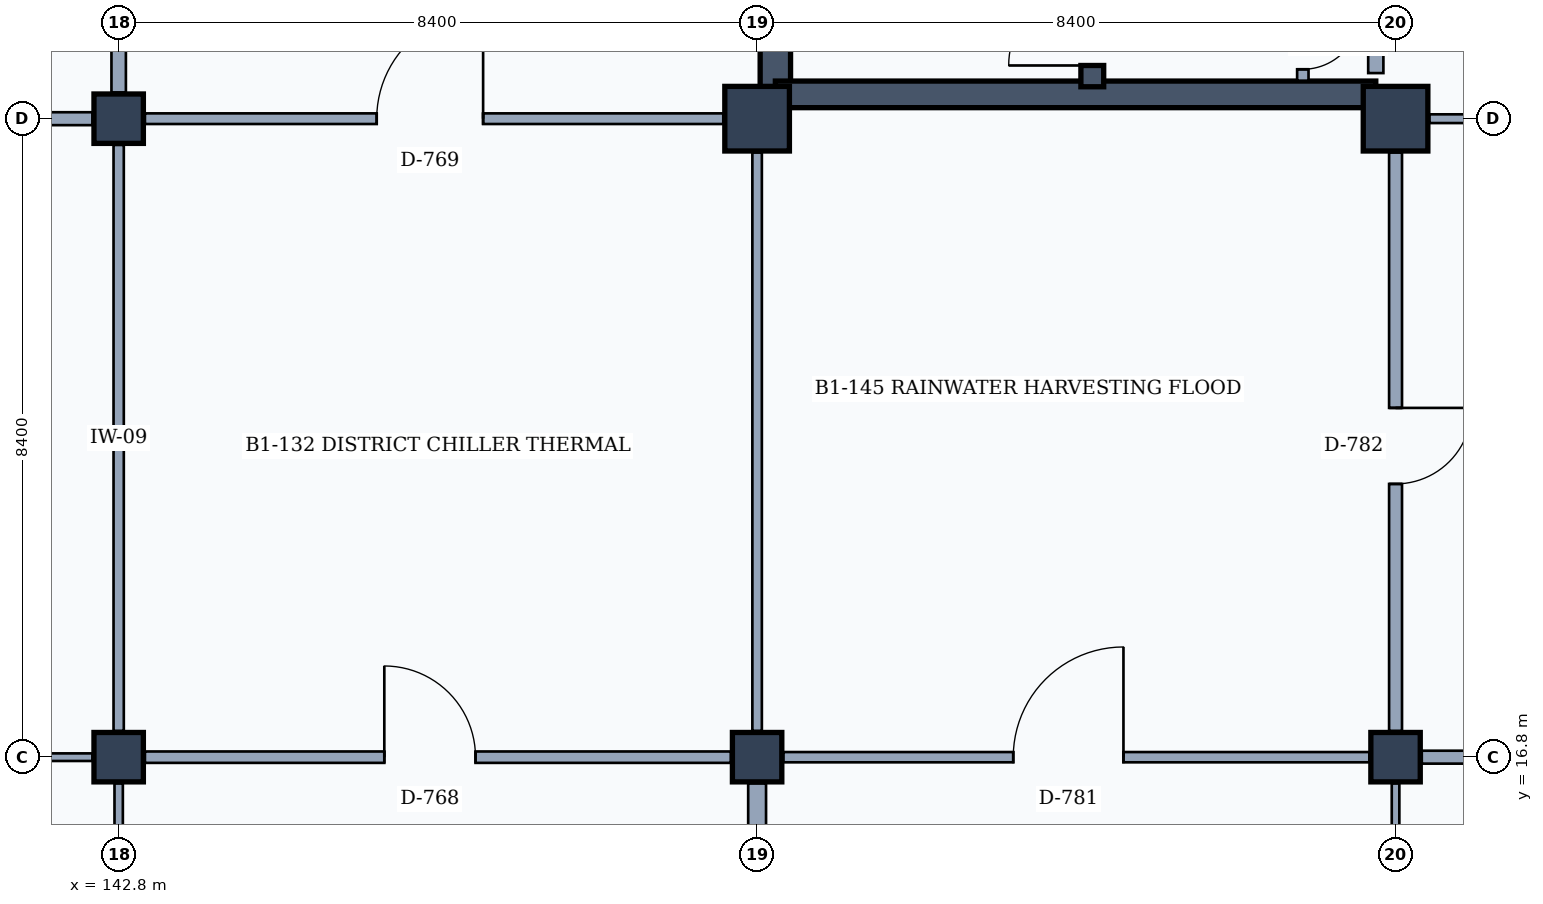
"""IFC4 building model, lengths in metres.
Left out: names, types, materials, properties, quantities, classifications, styles, units other than length and angle.
Written with IfcOpenShell. Run it as: python <this file> out.ifc"""

import sys

from ifc_helpers import new_model, si_unit, direction, frame, frame_2d, origin, origin_2d, place, context, subcontext, project, spatial, rectangle, extrude, element, fill, save


model = new_model("IFC4")
c1 = context("Model", 3, precision=1e-05, world=origin(), true_north=direction((0.0, 1.0)))
c2 = subcontext(c1, "Body", "Model", "MODEL_VIEW")
j1 = project(units=[si_unit("LENGTHUNIT", "METRE"), si_unit("PLANEANGLEUNIT", "RADIAN")], contexts=[c1])
p1 = place(None, origin())
s1 = spatial("IfcSite", under=j1, at=p1, CompositionType="ELEMENT")
p2 = place(p1, origin())
s2 = spatial("IfcBuilding", under=s1, at=p2, CompositionType="ELEMENT")
p3 = place(p2, frame((0.0, 0.0, -4.2)))
s3 = spatial("IfcBuildingStorey", under=s2, at=p3, CompositionType="ELEMENT", Elevation=-4.2)
for number, where, z_axis, x_axis in (
    (1, (142.8, 16.8, 0.0), (0.0, 0.0, 1.0), (1.0, 0.0, 0.0)),
    (2, (142.8, 25.2, 0.0), (0.0, 0.0, 1.0), (1.0, 0.0, 0.0)),
    (3, (151.2, 16.8, 0.0), (0.0, 0.0, 1.0), (1.0, 0.0, 0.0)),
):
    element("IfcColumn", number, at=place(p3, frame(where, z_axis=z_axis, x_axis=x_axis)), inside=s3, PredefinedType="COLUMN", context=c2, shape_type="SweptSolid", body=[
        extrude(rectangle(XDim=0.65, YDim=0.65, at=origin_2d()), origin(), (0.0, 0.0, 1.0), 4.2),
    ])
p4 = place(p3, frame((151.2, 25.2, 0.0), z_axis=(0.0, 0.0, 1.0), x_axis=(1.0, 0.0, 0.0)))
e4 = element("IfcColumn", 4, at=p4, inside=s3, PredefinedType="COLUMN", context=c2, shape_type="SweptSolid", body=[
    extrude(rectangle(XDim=0.85, YDim=0.85, at=origin_2d()), origin(), (0.0, 0.0, 1.0), 4.2),
])
p5 = place(p3, frame((159.6, 16.8, 0.0), z_axis=(0.0, 0.0, 1.0), x_axis=(1.0, 0.0, 0.0)))
e5 = element("IfcColumn", 5, at=p5, inside=s3, PredefinedType="COLUMN", context=c2, shape_type="SweptSolid", body=[
    extrude(rectangle(XDim=0.65, YDim=0.65, at=origin_2d()), origin(), (0.0, 0.0, 1.0), 4.2),
])
p6 = place(p3, frame((159.6, 25.2, 0.0), z_axis=(0.0, 0.0, 1.0), x_axis=(1.0, 0.0, 0.0)))
e6 = element("IfcColumn", 6, at=p6, inside=s3, PredefinedType="COLUMN", context=c2, shape_type="SweptSolid", body=[
    extrude(rectangle(XDim=0.85, YDim=0.85, at=origin_2d()), origin(), (0.0, 0.0, 1.0), 4.2),
])
p7 = place(p3, frame((151.44, 25.45, 0.0), z_axis=(0.0, 0.0, 1.0), x_axis=(0.0, 1.0, 0.0)))
e7 = element("IfcWall", 7, at=p7, inside=s3, PredefinedType="SHEAR", context=c2, shape_type="SweptSolid", body=[
    extrude(rectangle(XDim=7.94, YDim=0.4, at=frame_2d((3.97, 0.0))), origin(), (0.0, 0.0, 1.0), 3.9),
])
p8 = place(p3, frame((159.34, 33.0, 0.0), z_axis=(0.0, 0.0, 1.0), x_axis=(0.0, -1.0, 0.0)))
e8 = element("IfcWall", 8, at=p8, inside=s3, PredefinedType="PARTITIONING", context=c2, shape_type="SweptSolid", body=[
    extrude(rectangle(XDim=7.2, YDim=0.2, at=frame_2d((3.6, 0.0))), origin(), (0.0, 0.0, 1.0), 3.1),
])
p9 = place(p8, frame((3.55, 0.0, 0.0)))
e9 = element("IfcOpeningElement", 9, at=p9, cuts=e8, PredefinedType="OPENING", context=c2, shape_type="SweptSolid", body=[
    extrude(rectangle(XDim=1.1, YDim=2.15, at=frame_2d((0.55, 1.075))), frame((0.0, 0.11, 0.0), z_axis=(0.0, -1.0, 0.0), x_axis=(1.0, 0.0, 0.0)), (0.0, 0.0, 1.0), 0.22),
])
p10 = place(p3, frame((159.34, 25.52, 0.0), z_axis=(0.0, 0.0, 1.0), x_axis=(-1.0, 0.0, 0.0)))
e10 = element("IfcWall", 10, at=p10, inside=s3, PredefinedType="SHEAR", context=c2, shape_type="SweptSolid", body=[
    extrude(rectangle(XDim=7.9, YDim=0.35, at=frame_2d((3.95, 0.0))), origin(), (0.0, 0.0, 1.0), 3.9),
])
p11 = place(p3, frame((155.61, 25.62, 0.0), z_axis=(0.0, 0.0, 1.0), x_axis=(0.0, 1.0, 0.0)))
e11 = element("IfcWall", 11, at=p11, inside=s3, PredefinedType="SHEAR", context=c2, shape_type="SweptSolid", body=[
    extrude(rectangle(XDim=7.38, YDim=0.3, at=frame_2d((3.69, 0.0))), origin(), (0.0, 0.0, 1.0), 3.9),
])
p12 = place(p11, frame((0.28, 0.0, 0.0)))
e12 = element("IfcOpeningElement", 12, at=p12, cuts=e11, PredefinedType="OPENING", context=c2, shape_type="SweptSolid", body=[
    extrude(rectangle(XDim=1.1, YDim=2.15, at=frame_2d((0.55, 1.075))), frame((0.0, 0.16, 0.0), z_axis=(0.0, -1.0, 0.0), x_axis=(1.0, 0.0, 0.0)), (0.0, 0.0, 1.0), 0.32),
])
p13 = place(p3, frame((158.38, 26.76, 0.0), z_axis=(0.0, 0.0, 1.0), x_axis=(0.0, -1.0, 0.0)))
e13 = element("IfcWall", 13, at=p13, inside=s3, PredefinedType="PARTITIONING", context=c2, shape_type="SweptSolid", body=[
    extrude(rectangle(XDim=1.06, YDim=0.15, at=frame_2d((0.53, 0.0))), origin(), (0.0, 0.0, 1.0), 3.32),
])
p14 = place(p13, frame((0.16, 0.0, 0.0)))
e14 = element("IfcOpeningElement", 14, at=p14, cuts=e13, PredefinedType="OPENING", context=c2, shape_type="SweptSolid", body=[
    extrude(rectangle(XDim=0.75, YDim=2.05, at=frame_2d((0.375, 1.025))), frame((0.0, 0.085, 0.0), z_axis=(0.0, -1.0, 0.0), x_axis=(1.0, 0.0, 0.0)), (0.0, 0.0, 1.0), 0.17),
])
p15 = place(p3, frame((142.8, 8.745, 0.0), z_axis=(0.0, 0.0, 1.0), x_axis=(0.0, 1.0, 0.0)))
e15 = element("IfcWall", 15, at=p15, inside=s3, PredefinedType="PARTITIONING", context=c2, shape_type="SweptSolid", body=[
    extrude(rectangle(XDim=7.71, YDim=0.11, at=frame_2d((3.855, 0.0))), origin(), (0.0, 0.0, 1.0), 3.1),
])
p16 = place(p3, frame((134.745, 16.8, 0.0), z_axis=(0.0, 0.0, 1.0), x_axis=(1.0, 0.0, 0.0)))
e16 = element("IfcWall", 16, at=p16, inside=s3, PredefinedType="MOVABLE", context=c2, shape_type="SweptSolid", body=[
    extrude(rectangle(XDim=7.71, YDim=0.1, at=frame_2d((3.855, 0.0))), origin(), (0.0, 0.0, 1.0), 3.05),
])
p17 = place(p16, frame((3.225, 0.0, 0.0)))
e17 = element("IfcOpeningElement", 17, at=p17, cuts=e16, PredefinedType="OPENING", context=c2, shape_type="SweptSolid", body=[
    extrude(rectangle(XDim=1.05, YDim=2.2, at=frame_2d((0.525, 1.1))), frame((0.0, 0.06, 0.0), z_axis=(0.0, -1.0, 0.0), x_axis=(1.0, 0.0, 0.0)), (0.0, 0.0, 1.0), 0.12),
])
p18 = place(p3, frame((142.8, 17.145, 0.0), z_axis=(0.0, 0.0, 1.0), x_axis=(0.0, 1.0, 0.0)))
e18 = element("IfcWall", 18, at=p18, inside=s3, PredefinedType="PARTITIONING", context=c2, shape_type="SweptSolid", body=[
    extrude(rectangle(XDim=7.71, YDim=0.135, at=frame_2d((3.855, 0.0))), origin(), (0.0, 0.0, 1.0), 3.1),
])
p19 = place(p3, frame((134.745, 25.2, 0.0), z_axis=(0.0, 0.0, 1.0), x_axis=(1.0, 0.0, 0.0)))
e19 = element("IfcWall", 19, at=p19, inside=s3, PredefinedType="PARTITIONING", context=c2, shape_type="SweptSolid", body=[
    extrude(rectangle(XDim=7.71, YDim=0.17, at=frame_2d((3.855, 0.0))), origin(), (0.0, 0.0, 1.0), 3.05),
])
p20 = place(p19, frame((3.175, 0.0, 0.0)))
e20 = element("IfcOpeningElement", 20, at=p20, cuts=e19, PredefinedType="OPENING", context=c2, shape_type="SweptSolid", body=[
    extrude(rectangle(XDim=1.15, YDim=2.25, at=frame_2d((0.575, 1.125))), frame((0.0, 0.095, 0.0), z_axis=(0.0, -1.0, 0.0), x_axis=(1.0, 0.0, 0.0)), (0.0, 0.0, 1.0), 0.19),
])
p21 = place(p3, frame((142.8, 25.545, 0.0), z_axis=(0.0, 0.0, 1.0), x_axis=(0.0, 1.0, 0.0)))
e21 = element("IfcWall", 21, at=p21, inside=s3, PredefinedType="PARTITIONING", context=c2, shape_type="SweptSolid", body=[
    extrude(rectangle(XDim=7.71, YDim=0.19, at=frame_2d((3.855, 0.0))), origin(), (0.0, 0.0, 1.0), 3.1),
])
p22 = place(p3, frame((151.2, 8.745, 0.0), z_axis=(0.0, 0.0, 1.0), x_axis=(0.0, 1.0, 0.0)))
e22 = element("IfcWall", 22, at=p22, inside=s3, PredefinedType="PARTITIONING", context=c2, shape_type="SweptSolid", body=[
    extrude(rectangle(XDim=7.71, YDim=0.235, at=frame_2d((3.855, 0.0))), origin(), (0.0, 0.0, 1.0), 3.1),
])
p23 = place(p3, frame((143.145, 16.8, 0.0), z_axis=(0.0, 0.0, 1.0), x_axis=(1.0, 0.0, 0.0)))
e23 = element("IfcWall", 23, at=p23, inside=s3, PredefinedType="PARTITIONING", context=c2, shape_type="SweptSolid", body=[
    extrude(rectangle(XDim=7.71, YDim=0.15, at=frame_2d((3.855, 0.0))), origin(), (0.0, 0.0, 1.0), 3.05),
])
p24 = place(p23, frame((3.15, 0.0, 0.0)))
e24 = element("IfcOpeningElement", 24, at=p24, cuts=e23, PredefinedType="OPENING", context=c2, shape_type="SweptSolid", body=[
    extrude(rectangle(XDim=1.2, YDim=2.2, at=frame_2d((0.6, 1.1))), frame((0.0, 0.085, 0.0), z_axis=(0.0, -1.0, 0.0), x_axis=(1.0, 0.0, 0.0)), (0.0, 0.0, 1.0), 0.17),
])
p25 = place(p3, frame((151.2, 17.145, 0.0), z_axis=(0.0, 0.0, 1.0), x_axis=(0.0, 1.0, 0.0)))
e25 = element("IfcWall", 25, at=p25, inside=s3, PredefinedType="PARTITIONING", context=c2, shape_type="SweptSolid", body=[
    extrude(rectangle(XDim=7.61, YDim=0.125, at=frame_2d((3.805, 0.0))), origin(), (0.0, 0.0, 1.0), 3.1),
])
p26 = place(p3, frame((143.145, 25.2, 0.0), z_axis=(0.0, 0.0, 1.0), x_axis=(1.0, 0.0, 0.0)))
e26 = element("IfcWall", 26, at=p26, inside=s3, PredefinedType="PARTITIONING", context=c2, shape_type="SweptSolid", body=[
    extrude(rectangle(XDim=7.61, YDim=0.14, at=frame_2d((3.805, 0.0))), origin(), (0.0, 0.0, 1.0), 3.05),
])
p27 = place(p26, frame((3.05, 0.0, 0.0)))
e27 = element("IfcOpeningElement", 27, at=p27, cuts=e26, PredefinedType="OPENING", context=c2, shape_type="SweptSolid", body=[
    extrude(rectangle(XDim=1.4, YDim=2.25, at=frame_2d((0.7, 1.125))), frame((0.0, 0.08, 0.0), z_axis=(0.0, -1.0, 0.0), x_axis=(1.0, 0.0, 0.0)), (0.0, 0.0, 1.0), 0.16),
])
p28 = place(p3, frame((159.6, 8.745, 0.0), z_axis=(0.0, 0.0, 1.0), x_axis=(0.0, 1.0, 0.0)))
e28 = element("IfcWall", 28, at=p28, inside=s3, PredefinedType="MOVABLE", context=c2, shape_type="SweptSolid", body=[
    extrude(rectangle(XDim=7.71, YDim=0.1, at=frame_2d((3.855, 0.0))), origin(), (0.0, 0.0, 1.0), 3.1),
])
p29 = place(p3, frame((151.545, 16.8, 0.0), z_axis=(0.0, 0.0, 1.0), x_axis=(1.0, 0.0, 0.0)))
e29 = element("IfcWall", 29, at=p29, inside=s3, PredefinedType="PARTITIONING", context=c2, shape_type="SweptSolid", body=[
    extrude(rectangle(XDim=7.71, YDim=0.135, at=frame_2d((3.855, 0.0))), origin(), (0.0, 0.0, 1.0), 3.05),
])
p30 = place(p29, frame((3.025, 0.0, 0.0)))
e30 = element("IfcOpeningElement", 30, at=p30, cuts=e29, PredefinedType="OPENING", context=c2, shape_type="SweptSolid", body=[
    extrude(rectangle(XDim=1.45, YDim=2.35, at=frame_2d((0.725, 1.175))), frame((0.0, 0.077, 0.0), z_axis=(0.0, -1.0, 0.0), x_axis=(1.0, 0.0, 0.0)), (0.0, 0.0, 1.0), 0.155),
])
p31 = place(p3, frame((159.6, 17.145, 0.0), z_axis=(0.0, 0.0, 1.0), x_axis=(0.0, 1.0, 0.0)))
e31 = element("IfcWall", 31, at=p31, inside=s3, PredefinedType="PARTITIONING", context=c2, shape_type="SweptSolid", body=[
    extrude(rectangle(XDim=7.61, YDim=0.17, at=frame_2d((3.805, 0.0))), origin(), (0.0, 0.0, 1.0), 3.1),
])
p32 = place(p31, frame((3.25, 0.0, 0.0)))
e32 = element("IfcOpeningElement", 32, at=p32, cuts=e31, PredefinedType="OPENING", context=c2, shape_type="SweptSolid", body=[
    extrude(rectangle(XDim=1.0, YDim=2.15, at=frame_2d((0.5, 1.075))), frame((0.0, 0.095, 0.0), z_axis=(0.0, -1.0, 0.0), x_axis=(1.0, 0.0, 0.0)), (0.0, 0.0, 1.0), 0.19),
])
p33 = place(p3, frame((159.945, 16.8, 0.0), z_axis=(0.0, 0.0, 1.0), x_axis=(1.0, 0.0, 0.0)))
e33 = element("IfcWall", 33, at=p33, inside=s3, PredefinedType="PARTITIONING", context=c2, shape_type="SweptSolid", body=[
    extrude(rectangle(XDim=7.71, YDim=0.17, at=frame_2d((3.855, 0.0))), origin(), (0.0, 0.0, 1.0), 3.05),
])
p34 = place(p33, frame((3.1, 0.0, 0.0)))
e34 = element("IfcOpeningElement", 34, at=p34, cuts=e33, PredefinedType="OPENING", context=c2, shape_type="SweptSolid", body=[
    extrude(rectangle(XDim=1.3, YDim=2.2, at=frame_2d((0.65, 1.1))), frame((0.0, 0.095, 0.0), z_axis=(0.0, -1.0, 0.0), x_axis=(1.0, 0.0, 0.0)), (0.0, 0.0, 1.0), 0.19),
])
p35 = place(p3, frame((160.045, 25.2, 0.0), z_axis=(0.0, 0.0, 1.0), x_axis=(1.0, 0.0, 0.0)))
e35 = element("IfcWall", 35, at=p35, inside=s3, PredefinedType="PARTITIONING", context=c2, shape_type="SweptSolid", body=[
    extrude(rectangle(XDim=7.61, YDim=0.115, at=frame_2d((3.805, 0.0))), origin(), (0.0, 0.0, 1.0), 3.05),
])
p36 = place(p35, frame((2.975, 0.0, 0.0)))
e36 = element("IfcOpeningElement", 36, at=p36, cuts=e35, PredefinedType="OPENING", context=c2, shape_type="SweptSolid", body=[
    extrude(rectangle(XDim=1.55, YDim=2.35, at=frame_2d((0.775, 1.175))), frame((0.0, 0.067, 0.0), z_axis=(0.0, -1.0, 0.0), x_axis=(1.0, 0.0, 0.0)), (0.0, 0.0, 1.0), 0.135),
])
p37 = place(p12, origin())
e37 = element("IfcDoor", 37, at=p37, inside=s3, OperationType="SINGLE_SWING_LEFT", PredefinedType="DOOR", context=c2, shape_type="SweptSolid", body=[
    extrude(rectangle(XDim=1.1, YDim=2.15, at=frame_2d((0.55, 1.075))), frame((0.0, 0.025, 0.0), z_axis=(0.0, -1.0, 0.0), x_axis=(1.0, 0.0, 0.0)), (0.0, 0.0, 1.0), 0.05),
])
fill(e12, e37)
p38 = place(p14, origin())
e38 = element("IfcDoor", 38, at=p38, inside=s3, OperationType="SINGLE_SWING_LEFT", PredefinedType="TRAPDOOR", context=c2, shape_type="SweptSolid", body=[
    extrude(rectangle(XDim=0.75, YDim=2.05, at=frame_2d((0.375, 1.025))), frame((0.0, 0.025, 0.0), z_axis=(0.0, -1.0, 0.0), x_axis=(1.0, 0.0, 0.0)), (0.0, 0.0, 1.0), 0.05),
])
fill(e14, e38)
p39 = place(p24, origin())
e39 = element("IfcDoor", 39, at=p39, inside=s3, OperationType="SINGLE_SWING_LEFT", PredefinedType="DOOR", context=c2, shape_type="SweptSolid", body=[
    extrude(rectangle(XDim=1.2, YDim=2.2, at=frame_2d((0.6, 1.1))), frame((0.0, 0.025, 0.0), z_axis=(0.0, -1.0, 0.0), x_axis=(1.0, 0.0, 0.0)), (0.0, 0.0, 1.0), 0.05),
])
fill(e24, e39)
p40 = place(p27, origin())
e40 = element("IfcDoor", 40, at=p40, inside=s3, OperationType="SINGLE_SWING_RIGHT", PredefinedType="DOOR", context=c2, shape_type="SweptSolid", body=[
    extrude(rectangle(XDim=1.4, YDim=2.25, at=frame_2d((0.7, 1.125))), frame((0.0, 0.025, 0.0), z_axis=(0.0, -1.0, 0.0), x_axis=(1.0, 0.0, 0.0)), (0.0, 0.0, 1.0), 0.05),
])
fill(e27, e40)
p41 = place(p30, origin())
e41 = element("IfcDoor", 41, at=p41, inside=s3, OperationType="SINGLE_SWING_RIGHT", PredefinedType="DOOR", context=c2, shape_type="SweptSolid", body=[
    extrude(rectangle(XDim=1.45, YDim=2.35, at=frame_2d((0.725, 1.175))), frame((0.0, 0.025, 0.0), z_axis=(0.0, -1.0, 0.0), x_axis=(1.0, 0.0, 0.0)), (0.0, 0.0, 1.0), 0.05),
])
fill(e30, e41)
p42 = place(p32, frame((1.0, 0.0, 0.0), z_axis=(0.0, 0.0, 1.0), x_axis=(-1.0, 0.0, 0.0)))
e42 = element("IfcDoor", 42, at=p42, inside=s3, OperationType="SINGLE_SWING_LEFT", PredefinedType="DOOR", context=c2, shape_type="SweptSolid", body=[
    extrude(rectangle(XDim=1.0, YDim=2.15, at=frame_2d((0.5, 1.075))), frame((0.0, 0.025, 0.0), z_axis=(0.0, -1.0, 0.0), x_axis=(1.0, 0.0, 0.0)), (0.0, 0.0, 1.0), 0.05),
])
fill(e32, e42)
save(model, sys.argv[1])
